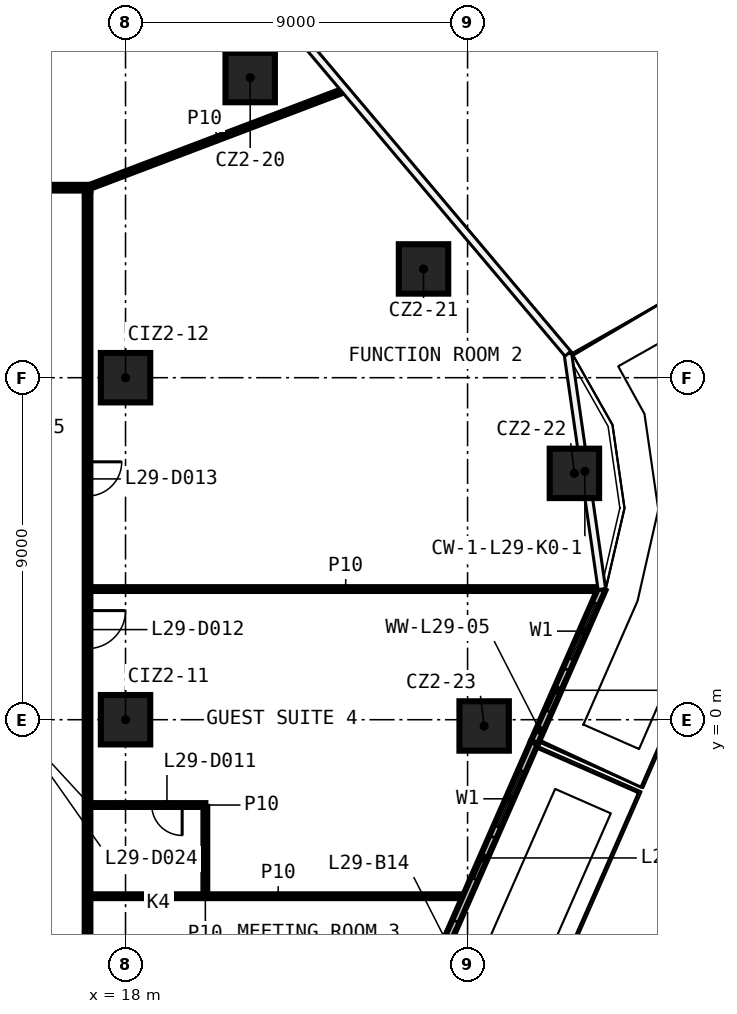
"""IFC4 building model, lengths in metres.
Left out: names, types, materials, properties, quantities, classifications, styles, units other than length and angle.
Written with IfcOpenShell. Run it as: python <this file> out.ifc"""

import sys

from ifc_helpers import new_model, si_unit, direction, frame, frame_2d, origin, origin_2d, place, context, subcontext, project, spatial, rectangle, extrude, element, fill, save


model = new_model("IFC4")
c1 = context("Model", 3, precision=1e-05, world=origin(), true_north=direction((0.0, 1.0)))
c2 = subcontext(c1, "Body", "Model", "MODEL_VIEW")
j1 = project(units=[si_unit("LENGTHUNIT", "METRE"), si_unit("PLANEANGLEUNIT", "RADIAN")], contexts=[c1])
p1 = place(None, origin())
s1 = spatial("IfcSite", under=j1, at=p1, CompositionType="ELEMENT")
p2 = place(p1, origin())
s2 = spatial("IfcBuilding", under=s1, at=p2, CompositionType="ELEMENT")
p3 = place(p2, frame((0.0, 0.0, 132.2)))
s3 = spatial("IfcBuildingStorey", under=s2, at=p3, CompositionType="ELEMENT", Elevation=132.2)
for number, where, z_axis, x_axis in (
    (1, (21.28, 16.898, 0.0), (0.0, 0.0, 1.0), (1.0, 0.0, 0.0)),
    (2, (25.841, 11.862, 0.0), (0.0, 0.0, 1.0), (1.0, 0.0, 0.0)),
    (3, (29.811, 6.482, 0.0), (0.0, 0.0, 1.0), (1.0, 0.0, 0.0)),
    (4, (27.436, -0.165, 0.0), (0.0, 0.0, 1.0), (1.0, 0.0, 0.0)),
    (5, (18.0, 0.0, 0.0), (0.0, 0.0, 1.0), (1.0, 0.0, 0.0)),
    (6, (18.0, 9.0, 0.0), (0.0, 0.0, 1.0), (1.0, 0.0, 0.0)),
):
    element("IfcColumn", number, at=place(p3, frame(where, z_axis=z_axis, x_axis=x_axis)), inside=s3, PredefinedType="COLUMN", context=c2, shape_type="SweptSolid", body=[
        extrude(rectangle(XDim=1.3, YDim=1.3, at=origin_2d()), origin(), (0.0, 0.0, 1.0), 3.3),
    ])
p4 = place(p3, frame((17.075, -4.645, 0.0), z_axis=(0.0, 0.0, 1.0), x_axis=(1.0, 0.0, 0.0)))
e7 = element("IfcWall", 7, at=p4, inside=s3, PredefinedType="PARTITIONING", context=c2, shape_type="SweptSolid", body=[
    extrude(rectangle(XDim=9.885, YDim=0.1, at=frame_2d((4.943, 0.0))), origin(), (0.0, 0.0, 1.0), 3.3),
])
p5 = place(p3, frame((20.1, -2.245, 0.0), z_axis=(0.0, 0.0, 1.0), x_axis=(-1.0, 0.0, 0.0)))
e8 = element("IfcWall", 8, at=p5, inside=s3, PredefinedType="PARTITIONING", context=c2, shape_type="SweptSolid", body=[
    extrude(rectangle(XDim=3.025, YDim=0.1, at=frame_2d((1.513, 0.0))), origin(), (0.0, 0.0, 1.0), 3.3),
])
p6 = place(p5, frame((0.61, 0.0, 0.0)))
e9 = element("IfcOpeningElement", 9, at=p6, cuts=e8, PredefinedType="OPENING", context=c2, shape_type="SweptSolid", body=[
    extrude(rectangle(XDim=0.8, YDim=2.1, at=frame_2d((0.4, 1.05))), frame((0.0, 0.06, 0.0), z_axis=(0.0, -1.0, 0.0), x_axis=(1.0, 0.0, 0.0)), (0.0, 0.0, 1.0), 0.12),
])
p7 = place(p3, frame((17.075, 3.438, 0.0), z_axis=(0.0, 0.0, 1.0), x_axis=(1.0, 0.0, 0.0)))
e10 = element("IfcWall", 10, at=p7, inside=s3, PredefinedType="PARTITIONING", context=c2, shape_type="SweptSolid", body=[
    extrude(rectangle(XDim=13.436, YDim=0.1, at=frame_2d((6.718, 0.0))), origin(), (0.0, 0.0, 1.0), 3.3),
])
p8 = place(p3, frame((-17.075, 14.0, 0.0), z_axis=(0.0, 0.0, 1.0), x_axis=(1.0, 0.0, 0.0)))
e11 = element("IfcWall", 11, at=p8, inside=s3, PredefinedType="PARTITIONING", context=c2, shape_type="SweptSolid", body=[
    extrude(rectangle(XDim=34.15, YDim=0.15, at=frame_2d((17.075, 0.0))), origin(), (0.0, 0.0, 1.0), 3.3),
])
p9 = place(p8, frame((10.954, 0.0, 0.0)))
e12 = element("IfcOpeningElement", 12, at=p9, cuts=e11, PredefinedType="OPENING", context=c2, shape_type="SweptSolid", body=[
    extrude(rectangle(XDim=0.9, YDim=2.1, at=frame_2d((0.45, 1.05))), frame((0.0, 0.085, 0.0), z_axis=(0.0, -1.0, 0.0), x_axis=(1.0, 0.0, 0.0)), (0.0, 0.0, 1.0), 0.17),
])
p10 = place(p8, frame((7.617, 0.0, 0.0)))
e13 = element("IfcOpeningElement", 13, at=p10, cuts=e11, PredefinedType="OPENING", context=c2, shape_type="SweptSolid", body=[
    extrude(rectangle(XDim=1.0, YDim=2.1, at=frame_2d((0.5, 1.05))), frame((0.0, 0.085, 0.0), z_axis=(0.0, -1.0, 0.0), x_axis=(1.0, 0.0, 0.0)), (0.0, 0.0, 1.0), 0.17),
])
p11 = place(p8, frame((2.425, 0.0, 0.0)))
e14 = element("IfcOpeningElement", 14, at=p11, cuts=e11, PredefinedType="OPENING", context=c2, shape_type="SweptSolid", body=[
    extrude(rectangle(XDim=0.9, YDim=2.1, at=frame_2d((0.45, 1.05))), frame((0.0, 0.085, 0.0), z_axis=(0.0, -1.0, 0.0), x_axis=(1.0, 0.0, 0.0)), (0.0, 0.0, 1.0), 0.17),
])
p12 = place(p3, frame((17.0, 14.0, 0.0), z_axis=(0.0, 0.0, 1.0), x_axis=(0.934953139897, 0.354771230791, 0.0)))
e15 = element("IfcWall", 15, at=p12, inside=s3, PredefinedType="PARTITIONING", context=c2, shape_type="SweptSolid", body=[
    extrude(rectangle(XDim=7.234, YDim=0.1, at=frame_2d((3.617, 0.0))), origin(), (0.0, 0.0, 1.0), 3.3),
])
p13 = place(p3, frame((20.1, -4.595, 0.0), z_axis=(0.0, 0.0, 1.0), x_axis=(0.0, 1.0, 0.0)))
e16 = element("IfcWall", 16, at=p13, inside=s3, PredefinedType="PARTITIONING", context=c2, shape_type="SweptSolid", body=[
    extrude(rectangle(XDim=2.3, YDim=0.1, at=frame_2d((1.15, 0.0))), origin(), (0.0, 0.0, 1.0), 3.3),
])
p14 = place(p3, frame((17.0, 13.925, 0.0), z_axis=(0.0, 0.0, 1.0), x_axis=(0.0, -1.0, 0.0)))
e17 = element("IfcWall", 17, at=p14, inside=s3, PredefinedType="PARTITIONING", context=c2, shape_type="SweptSolid", body=[
    extrude(rectangle(XDim=27.85, YDim=0.15, at=frame_2d((13.925, 0.0))), origin(), (0.0, 0.0, 1.0), 3.3),
])
p15 = place(p14, frame((24.983, 0.0, 0.0)))
e18 = element("IfcOpeningElement", 18, at=p15, cuts=e17, PredefinedType="OPENING", context=c2, shape_type="SweptSolid", body=[
    extrude(rectangle(XDim=0.9, YDim=2.1, at=frame_2d((0.45, 1.05))), frame((0.0, 0.085, 0.0), z_axis=(0.0, -1.0, 0.0), x_axis=(1.0, 0.0, 0.0)), (0.0, 0.0, 1.0), 0.17),
])
p16 = place(p14, frame((20.143, 0.0, 0.0)))
e19 = element("IfcOpeningElement", 19, at=p16, cuts=e17, PredefinedType="OPENING", context=c2, shape_type="SweptSolid", body=[
    extrude(rectangle(XDim=0.9, YDim=2.1, at=frame_2d((0.45, 1.05))), frame((0.0, 0.085, 0.0), z_axis=(0.0, -1.0, 0.0), x_axis=(1.0, 0.0, 0.0)), (0.0, 0.0, 1.0), 0.17),
])
p17 = place(p14, frame((11.054, 0.0, 0.0)))
e20 = element("IfcOpeningElement", 20, at=p17, cuts=e17, PredefinedType="OPENING", context=c2, shape_type="SweptSolid", body=[
    extrude(rectangle(XDim=1.0, YDim=2.1, at=frame_2d((0.5, 1.05))), frame((0.0, 0.085, 0.0), z_axis=(0.0, -1.0, 0.0), x_axis=(1.0, 0.0, 0.0)), (0.0, 0.0, 1.0), 0.17),
])
p18 = place(p14, frame((7.139, 0.0, 0.0)))
e21 = element("IfcOpeningElement", 21, at=p18, cuts=e17, PredefinedType="OPENING", context=c2, shape_type="SweptSolid", body=[
    extrude(rectangle(XDim=0.9, YDim=2.1, at=frame_2d((0.45, 1.05))), frame((0.0, 0.085, 0.0), z_axis=(0.0, -1.0, 0.0), x_axis=(1.0, 0.0, 0.0)), (0.0, 0.0, 1.0), 0.17),
])
p19 = place(p3, frame((21.65, -16.783, 0.0), z_axis=(0.0, 0.0, 1.0), x_axis=(0.402171088909, 0.915564533633, 0.0)))
e22 = element("IfcWall", 22, at=p19, inside=s3, PredefinedType="SOLIDWALL", context=c2, shape_type="SweptSolid", body=[
    extrude(rectangle(XDim=17.677, YDim=0.2, at=frame_2d((8.838, 0.0))), origin(), (0.0, 0.0, 1.0), 3.3),
])
p20 = place(p19, frame((2.0, 0.0, 0.6)))
e23 = element("IfcOpeningElement", 23, at=p20, cuts=e22, PredefinedType="OPENING", context=c2, shape_type="SweptSolid", body=[
    extrude(rectangle(XDim=1.6, YDim=2.4, at=frame_2d((0.8, 1.2))), frame((0.0, 0.11, 0.0), z_axis=(0.0, -1.0, 0.0), x_axis=(1.0, 0.0, 0.0)), (0.0, 0.0, 1.0), 0.22),
])
p21 = place(p19, frame((0.5, 0.0, 0.0)))
e24 = element("IfcOpeningElement", 24, at=p21, cuts=e22, PredefinedType="OPENING", context=c2, shape_type="SweptSolid", body=[
    extrude(rectangle(XDim=1.2, YDim=2.4, at=frame_2d((0.6, 1.2))), frame((0.0, 0.11, 0.0), z_axis=(0.0, -1.0, 0.0), x_axis=(1.0, 0.0, 0.0)), (0.0, 0.0, 1.0), 0.22),
])
p22 = place(p19, frame((6.419, 0.0, 0.6)))
e25 = element("IfcOpeningElement", 25, at=p22, cuts=e22, PredefinedType="OPENING", context=c2, shape_type="SweptSolid", body=[
    extrude(rectangle(XDim=1.6, YDim=2.4, at=frame_2d((0.8, 1.2))), frame((0.0, 0.11, 0.0), z_axis=(0.0, -1.0, 0.0), x_axis=(1.0, 0.0, 0.0)), (0.0, 0.0, 1.0), 0.22),
])
p23 = place(p19, frame((4.919, 0.0, 0.0)))
e26 = element("IfcOpeningElement", 26, at=p23, cuts=e22, PredefinedType="OPENING", context=c2, shape_type="SweptSolid", body=[
    extrude(rectangle(XDim=1.2, YDim=2.4, at=frame_2d((0.6, 1.2))), frame((0.0, 0.11, 0.0), z_axis=(0.0, -1.0, 0.0), x_axis=(1.0, 0.0, 0.0)), (0.0, 0.0, 1.0), 0.22),
])
p24 = place(p19, frame((9.338, 0.0, 0.6)))
e27 = element("IfcOpeningElement", 27, at=p24, cuts=e22, PredefinedType="OPENING", context=c2, shape_type="SweptSolid", body=[
    extrude(rectangle(XDim=1.6, YDim=2.4, at=frame_2d((0.8, 1.2))), frame((0.0, 0.11, 0.0), z_axis=(0.0, -1.0, 0.0), x_axis=(1.0, 0.0, 0.0)), (0.0, 0.0, 1.0), 0.22),
])
p25 = place(p19, frame((11.338, 0.0, 0.0)))
e28 = element("IfcOpeningElement", 28, at=p25, cuts=e22, PredefinedType="OPENING", context=c2, shape_type="SweptSolid", body=[
    extrude(rectangle(XDim=1.2, YDim=2.4, at=frame_2d((0.6, 1.2))), frame((0.0, 0.11, 0.0), z_axis=(0.0, -1.0, 0.0), x_axis=(1.0, 0.0, 0.0)), (0.0, 0.0, 1.0), 0.22),
])
p26 = place(p19, frame((15.258, 0.0, 0.6)))
e29 = element("IfcOpeningElement", 29, at=p26, cuts=e22, PredefinedType="OPENING", context=c2, shape_type="SweptSolid", body=[
    extrude(rectangle(XDim=1.6, YDim=2.4, at=frame_2d((0.8, 1.2))), frame((0.0, 0.11, 0.0), z_axis=(0.0, -1.0, 0.0), x_axis=(1.0, 0.0, 0.0)), (0.0, 0.0, 1.0), 0.22),
])
p27 = place(p19, frame((13.758, 0.0, 0.0)))
e30 = element("IfcOpeningElement", 30, at=p27, cuts=e22, PredefinedType="OPENING", context=c2, shape_type="SweptSolid", body=[
    extrude(rectangle(XDim=1.2, YDim=2.4, at=frame_2d((0.6, 1.2))), frame((0.0, 0.11, 0.0), z_axis=(0.0, -1.0, 0.0), x_axis=(1.0, 0.0, 0.0)), (0.0, 0.0, 1.0), 0.22),
])
p28 = place(p3, frame((28.76, -0.599, 0.0), z_axis=(0.0, 0.0, 1.0), x_axis=(0.402194955318, 0.915554049697, 0.0)))
e31 = element("IfcWall", 31, at=p28, inside=s3, PredefinedType="SOLIDWALL", context=c2, shape_type="SweptSolid", body=[
    extrude(rectangle(XDim=4.41, YDim=0.2, at=frame_2d((2.205, 0.0))), origin(), (0.0, 0.0, 1.0), 3.3),
])
p29 = place(p28, frame((2.4, 0.0, 0.6)))
e32 = element("IfcOpeningElement", 32, at=p29, cuts=e31, PredefinedType="OPENING", context=c2, shape_type="SweptSolid", body=[
    extrude(rectangle(XDim=1.6, YDim=2.4, at=frame_2d((0.8, 1.2))), frame((0.0, 0.11, 0.0), z_axis=(0.0, -1.0, 0.0), x_axis=(1.0, 0.0, 0.0)), (0.0, 0.0, 1.0), 0.22),
])
p30 = place(p28, frame((0.9, 0.0, 0.0)))
e33 = element("IfcOpeningElement", 33, at=p30, cuts=e31, PredefinedType="OPENING", context=c2, shape_type="SweptSolid", body=[
    extrude(rectangle(XDim=1.2, YDim=2.4, at=frame_2d((0.6, 1.2))), frame((0.0, 0.11, 0.0), z_axis=(0.0, -1.0, 0.0), x_axis=(1.0, 0.0, 0.0)), (0.0, 0.0, 1.0), 0.22),
])
p31 = place(p6, origin())
e34 = element("IfcDoor", 34, at=p31, inside=s3, OperationType="SINGLE_SWING_LEFT", PredefinedType="DOOR", context=c2, shape_type="SweptSolid", body=[
    extrude(rectangle(XDim=0.8, YDim=2.1, at=frame_2d((0.4, 1.05))), frame((0.0, 0.025, 0.0), z_axis=(0.0, -1.0, 0.0), x_axis=(1.0, 0.0, 0.0)), (0.0, 0.0, 1.0), 0.05),
])
fill(e9, e34)
p32 = place(p17, origin())
e35 = element("IfcDoor", 35, at=p32, inside=s3, OperationType="SINGLE_SWING_RIGHT", PredefinedType="DOOR", context=c2, shape_type="SweptSolid", body=[
    extrude(rectangle(XDim=1.0, YDim=2.1, at=frame_2d((0.5, 1.05))), frame((0.0, 0.025, 0.0), z_axis=(0.0, -1.0, 0.0), x_axis=(1.0, 0.0, 0.0)), (0.0, 0.0, 1.0), 0.05),
])
fill(e20, e35)
p33 = place(p18, origin())
e36 = element("IfcDoor", 36, at=p33, inside=s3, OperationType="SINGLE_SWING_LEFT", PredefinedType="DOOR", context=c2, shape_type="SweptSolid", body=[
    extrude(rectangle(XDim=0.9, YDim=2.1, at=frame_2d((0.45, 1.05))), frame((0.0, 0.025, 0.0), z_axis=(0.0, -1.0, 0.0), x_axis=(1.0, 0.0, 0.0)), (0.0, 0.0, 1.0), 0.05),
])
fill(e21, e36)
p34 = place(p25, origin())
e37 = element("IfcDoor", 37, at=p34, inside=s3, OperationType="SLIDING_TO_LEFT", PredefinedType="DOOR", context=c2, shape_type="SweptSolid", body=[
    extrude(rectangle(XDim=1.2, YDim=2.4, at=frame_2d((0.6, 1.2))), frame((0.0, 0.025, 0.0), z_axis=(0.0, -1.0, 0.0), x_axis=(1.0, 0.0, 0.0)), (0.0, 0.0, 1.0), 0.05),
])
fill(e28, e37)
p35 = place(p26, origin())
e38 = element("IfcWindow", 38, at=p35, inside=s3, PartitioningType="SINGLE_PANEL", PredefinedType="WINDOW", context=c2, shape_type="SweptSolid", body=[
    extrude(rectangle(XDim=1.6, YDim=2.4, at=frame_2d((0.8, 1.2))), frame((0.0, 0.03, 0.0), z_axis=(0.0, -1.0, 0.0), x_axis=(1.0, 0.0, 0.0)), (0.0, 0.0, 1.0), 0.06),
])
fill(e29, e38)
p36 = place(p27, origin())
e39 = element("IfcDoor", 39, at=p36, inside=s3, OperationType="SLIDING_TO_LEFT", PredefinedType="DOOR", context=c2, shape_type="SweptSolid", body=[
    extrude(rectangle(XDim=1.2, YDim=2.4, at=frame_2d((0.6, 1.2))), frame((0.0, 0.025, 0.0), z_axis=(0.0, -1.0, 0.0), x_axis=(1.0, 0.0, 0.0)), (0.0, 0.0, 1.0), 0.05),
])
fill(e30, e39)
p37 = place(p29, origin())
e40 = element("IfcWindow", 40, at=p37, inside=s3, PartitioningType="SINGLE_PANEL", PredefinedType="WINDOW", context=c2, shape_type="SweptSolid", body=[
    extrude(rectangle(XDim=1.6, YDim=2.4, at=frame_2d((0.8, 1.2))), frame((0.0, 0.03, 0.0), z_axis=(0.0, -1.0, 0.0), x_axis=(1.0, 0.0, 0.0)), (0.0, 0.0, 1.0), 0.06),
])
fill(e32, e40)
p38 = place(p30, origin())
e41 = element("IfcDoor", 41, at=p38, inside=s3, OperationType="SLIDING_TO_LEFT", PredefinedType="DOOR", context=c2, shape_type="SweptSolid", body=[
    extrude(rectangle(XDim=1.2, YDim=2.4, at=frame_2d((0.6, 1.2))), frame((0.0, 0.025, 0.0), z_axis=(0.0, -1.0, 0.0), x_axis=(1.0, 0.0, 0.0)), (0.0, 0.0, 1.0), 0.05),
])
fill(e33, e41)
save(model, sys.argv[1])
